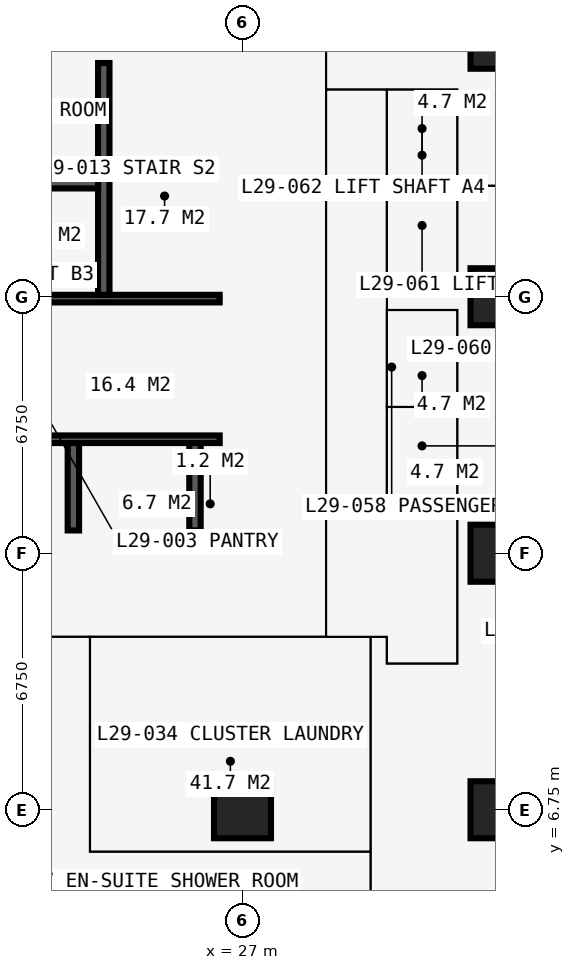
"""IFC4 building model, lengths in metres.
Left out: names, types, materials, properties, quantities, classifications, styles, units other than length and angle.
Written with IfcOpenShell. Run it as: python <this file> out.ifc"""

import sys

from ifc_helpers import new_model, si_unit, direction, frame, frame_2d, origin, origin_2d, place, context, subcontext, project, spatial, rectangle, extrude, element, fill, save


model = new_model("IFC4")
c1 = context("Model", 3, precision=1e-05, world=origin(), true_north=direction((0.0, 1.0)))
c2 = subcontext(c1, "Body", "Model", "MODEL_VIEW")
j1 = project(units=[si_unit("LENGTHUNIT", "METRE"), si_unit("PLANEANGLEUNIT", "RADIAN")], contexts=[c1])
p1 = place(None, origin())
s1 = spatial("IfcSite", under=j1, at=p1, CompositionType="ELEMENT")
p2 = place(p1, origin())
s2 = spatial("IfcBuilding", under=s1, at=p2, CompositionType="ELEMENT")
p3 = place(p2, frame((0.0, 0.0, 108.9)))
s3 = spatial("IfcBuildingStorey", under=s2, at=p3, CompositionType="ELEMENT", Elevation=108.9)
for number, where, z_axis, x_axis in (
    (1, (27.0, 6.75, 0.0), (0.0, 0.0, 1.0), (1.0, 0.0, 0.0)),
    (2, (33.75, 6.75, 0.0), (0.0, 0.0, 1.0), (1.0, 0.0, 0.0)),
    (3, (33.75, 13.5, 0.0), (0.0, 0.0, 1.0), (1.0, 0.0, 0.0)),
    (4, (33.75, 20.25, 0.0), (0.0, 0.0, 1.0), (1.0, 0.0, 0.0)),
    (5, (33.75, 27.0, 0.0), (0.0, 0.0, 1.0), (1.0, 0.0, 0.0)),
):
    element("IfcColumn", number, at=place(p3, frame(where, z_axis=z_axis, x_axis=x_axis)), inside=s3, PredefinedType="COLUMN", context=c2, shape_type="SweptSolid", body=[
        extrude(rectangle(XDim=1.5, YDim=1.5, at=origin_2d()), origin(), (0.0, 0.0, 1.0), 3.6),
    ])
p4 = place(p3, frame((12.9, 13.5, 0.0), z_axis=(0.0, 0.0, 1.0), x_axis=(1.0, 0.0, 0.0)))
e6 = element("IfcWall", 6, at=p4, inside=s3, PredefinedType="SHEAR", context=c2, shape_type="SweptSolid", body=[
    extrude(rectangle(XDim=14.7, YDim=1.2, at=frame_2d((7.35, 0.0))), origin(), (0.0, 0.0, 1.0), 3.6),
])
p5 = place(p3, frame((27.0, 14.1, 0.0), z_axis=(0.0, 0.0, 1.0), x_axis=(0.0, 1.0, 0.0)))
e7 = element("IfcWall", 7, at=p5, inside=s3, PredefinedType="SHEAR", context=c2, shape_type="SweptSolid", body=[
    extrude(rectangle(XDim=12.3, YDim=1.2, at=frame_2d((6.15, 0.0))), origin(), (0.0, 0.0, 1.0), 3.6),
])
p6 = place(p5, frame((3.65, 0.0, 0.0)))
e8 = element("IfcOpeningElement", 8, at=p6, cuts=e7, PredefinedType="OPENING", context=c2, shape_type="SweptSolid", body=[
    extrude(rectangle(XDim=1.2, YDim=2.2, at=frame_2d((0.6, 1.1))), frame((0.0, 0.61, 0.0), z_axis=(0.0, -1.0, 0.0), x_axis=(1.0, 0.0, 0.0)), (0.0, 0.0, 1.0), 1.22),
])
p7 = place(p3, frame((27.6, 27.0, 0.0), z_axis=(0.0, 0.0, 1.0), x_axis=(-1.0, 0.0, 0.0)))
e9 = element("IfcWall", 9, at=p7, inside=s3, PredefinedType="SHEAR", context=c2, shape_type="SweptSolid", body=[
    extrude(rectangle(XDim=14.7, YDim=1.2, at=frame_2d((7.35, 0.0))), origin(), (0.0, 0.0, 1.0), 3.6),
])
p8 = place(p7, frame((4.55, 0.0, 0.0)))
e10 = element("IfcOpeningElement", 10, at=p8, cuts=e9, PredefinedType="OPENING", context=c2, shape_type="SweptSolid", body=[
    extrude(rectangle(XDim=0.9, YDim=2.2, at=frame_2d((0.45, 1.1))), frame((0.0, 0.61, 0.0), z_axis=(0.0, -1.0, 0.0), x_axis=(1.0, 0.0, 0.0)), (0.0, 0.0, 1.0), 1.22),
])
p9 = place(p7, frame((7.525, 0.0, 0.0)))
e11 = element("IfcOpeningElement", 11, at=p9, cuts=e9, PredefinedType="OPENING", context=c2, shape_type="SweptSolid", body=[
    extrude(rectangle(XDim=1.0, YDim=2.2, at=frame_2d((0.5, 1.1))), frame((0.0, 0.61, 0.0), z_axis=(0.0, -1.0, 0.0), x_axis=(1.0, 0.0, 0.0)), (0.0, 0.0, 1.0), 1.22),
])
p10 = place(p3, frame((14.1, 16.5, 0.0), z_axis=(0.0, 0.0, 1.0), x_axis=(1.0, 0.0, 0.0)))
e12 = element("IfcWall", 12, at=p10, inside=s3, PredefinedType="SHEAR", context=c2, shape_type="SweptSolid", body=[
    extrude(rectangle(XDim=12.3, YDim=0.2, at=frame_2d((6.15, 0.0))), origin(), (0.0, 0.0, 1.0), 3.6),
])
p11 = place(p10, frame((0.9, 0.0, 0.0)))
e13 = element("IfcOpeningElement", 13, at=p11, cuts=e12, PredefinedType="OPENING", context=c2, shape_type="SweptSolid", body=[
    extrude(rectangle(XDim=1.1, YDim=2.2, at=frame_2d((0.55, 1.1))), frame((0.0, 0.11, 0.0), z_axis=(0.0, -1.0, 0.0), x_axis=(1.0, 0.0, 0.0)), (0.0, 0.0, 1.0), 0.22),
])
p12 = place(p10, frame((9.5, 0.0, 0.0)))
e14 = element("IfcOpeningElement", 14, at=p12, cuts=e12, PredefinedType="OPENING", context=c2, shape_type="SweptSolid", body=[
    extrude(rectangle(XDim=1.1, YDim=2.2, at=frame_2d((0.55, 1.1))), frame((0.0, 0.11, 0.0), z_axis=(0.0, -1.0, 0.0), x_axis=(1.0, 0.0, 0.0)), (0.0, 0.0, 1.0), 0.22),
])
p13 = place(p3, frame((14.1, 20.2, 0.0), z_axis=(0.0, 0.0, 1.0), x_axis=(1.0, 0.0, 0.0)))
e15 = element("IfcWall", 15, at=p13, inside=s3, PredefinedType="SHEAR", context=c2, shape_type="SweptSolid", body=[
    extrude(rectangle(XDim=12.3, YDim=0.2, at=frame_2d((6.15, 0.0))), origin(), (0.0, 0.0, 1.0), 3.6),
])
p14 = place(p13, frame((0.35, 0.0, 0.0)))
e16 = element("IfcOpeningElement", 16, at=p14, cuts=e15, PredefinedType="OPENING", context=c2, shape_type="SweptSolid", body=[
    extrude(rectangle(XDim=1.1, YDim=2.2, at=frame_2d((0.55, 1.1))), frame((0.0, 0.11, 0.0), z_axis=(0.0, -1.0, 0.0), x_axis=(1.0, 0.0, 0.0)), (0.0, 0.0, 1.0), 0.22),
])
p15 = place(p13, frame((9.75, 0.0, 0.0)))
e17 = element("IfcOpeningElement", 17, at=p15, cuts=e15, PredefinedType="OPENING", context=c2, shape_type="SweptSolid", body=[
    extrude(rectangle(XDim=1.1, YDim=2.2, at=frame_2d((0.55, 1.1))), frame((0.0, 0.11, 0.0), z_axis=(0.0, -1.0, 0.0), x_axis=(1.0, 0.0, 0.0)), (0.0, 0.0, 1.0), 0.22),
])
p16 = place(p3, frame((23.35, 20.3, 0.0), z_axis=(0.0, 0.0, 1.0), x_axis=(0.0, 1.0, 0.0)))
e18 = element("IfcWall", 18, at=p16, inside=s3, PredefinedType="SHEAR", context=c2, shape_type="SweptSolid", body=[
    extrude(rectangle(XDim=6.1, YDim=0.3, at=frame_2d((3.05, 0.0))), origin(), (0.0, 0.0, 1.0), 3.6),
])
p17 = place(p3, frame((17.3, 23.25, 0.0), z_axis=(0.0, 0.0, 1.0), x_axis=(1.0, 0.0, 0.0)))
e19 = element("IfcWall", 19, at=p17, inside=s3, PredefinedType="SHEAR", context=c2, shape_type="SweptSolid", body=[
    extrude(rectangle(XDim=5.9, YDim=0.3, at=frame_2d((2.95, 0.0))), origin(), (0.0, 0.0, 1.0), 3.6),
])
for number, where, z_axis, x_axis in (
    (20, (22.55, 14.1, 0.0), (0.0, 0.0, 1.0), (0.0, 1.0, 0.0)),
    (21, (25.75, 14.1, 0.0), (0.0, 0.0, 1.0), (0.0, 1.0, 0.0)),
):
    element("IfcWall", number, at=place(p3, frame(where, z_axis=z_axis, x_axis=x_axis)), inside=s3, PredefinedType="SHEAR", context=c2, shape_type="SweptSolid", body=[
        extrude(rectangle(XDim=2.3, YDim=0.3, at=frame_2d((1.15, 0.0))), origin(), (0.0, 0.0, 1.0), 3.6),
    ])
p18 = place(p3, frame((10.125, 11.3, 0.0), z_axis=(0.0, 0.0, 1.0), x_axis=(1.0, 0.0, 0.0)))
e22 = element("IfcWall", 22, at=p18, inside=s3, PredefinedType="PARTITIONING", context=c2, shape_type="SweptSolid", body=[
    extrude(rectangle(XDim=20.675, YDim=0.15, at=frame_2d((10.337, 0.0))), origin(), (0.0, 0.0, 1.0), 3.375),
])
p19 = place(p18, frame((11.312, 0.0, 0.0)))
e23 = element("IfcOpeningElement", 23, at=p19, cuts=e22, PredefinedType="OPENING", context=c2, shape_type="SweptSolid", body=[
    extrude(rectangle(XDim=1.0, YDim=2.2, at=frame_2d((0.5, 1.1))), frame((0.0, 0.085, 0.0), z_axis=(0.0, -1.0, 0.0), x_axis=(1.0, 0.0, 0.0)), (0.0, 0.0, 1.0), 0.17),
])
p20 = place(p3, frame((22.988, 5.65, 0.0), z_axis=(0.0, 0.0, 1.0), x_axis=(1.0, 0.0, 0.0)))
e24 = element("IfcWall", 24, at=p20, inside=s3, PredefinedType="PARTITIONING", context=c2, shape_type="SweptSolid", body=[
    extrude(rectangle(XDim=7.387, YDim=0.15, at=frame_2d((3.694, 0.0))), origin(), (0.0, 0.0, 1.0), 3.375),
])
p21 = place(p20, frame((2.3, 0.0, 0.0)))
e25 = element("IfcOpeningElement", 25, at=p21, cuts=e24, PredefinedType="OPENING", context=c2, shape_type="SweptSolid", body=[
    extrude(rectangle(XDim=0.95, YDim=2.2, at=frame_2d((0.475, 1.1))), frame((0.0, 0.085, 0.0), z_axis=(0.0, -1.0, 0.0), x_axis=(1.0, 0.0, 0.0)), (0.0, 0.0, 1.0), 0.17),
])
p22 = place(p3, frame((22.988, 5.65, 0.0), z_axis=(0.0, 0.0, 1.0), x_axis=(0.0, 1.0, 0.0)))
e26 = element("IfcWall", 26, at=p22, inside=s3, PredefinedType="PARTITIONING", context=c2, shape_type="SweptSolid", body=[
    extrude(rectangle(XDim=5.65, YDim=0.15, at=frame_2d((2.825, 0.0))), origin(), (0.0, 0.0, 1.0), 3.375),
])
p23 = place(p3, frame((29.2, 11.3, 0.0), z_axis=(0.0, 0.0, 1.0), x_axis=(0.0, 1.0, 0.0)))
e27 = element("IfcWall", 27, at=p23, inside=s3, PredefinedType="PARTITIONING", context=c2, shape_type="SweptSolid", body=[
    extrude(rectangle(XDim=20.3, YDim=0.15, at=frame_2d((10.15, 0.0))), origin(), (0.0, 0.0, 1.0), 3.375),
])
p24 = place(p23, frame((8.35, 0.0, 0.0)))
e28 = element("IfcOpeningElement", 28, at=p24, cuts=e27, PredefinedType="OPENING", context=c2, shape_type="SweptSolid", body=[
    extrude(rectangle(XDim=1.2, YDim=2.2, at=frame_2d((0.6, 1.1))), frame((0.0, 0.085, 0.0), z_axis=(0.0, -1.0, 0.0), x_axis=(1.0, 0.0, 0.0)), (0.0, 0.0, 1.0), 0.17),
])
p25 = place(p3, frame((29.2, 25.7, 0.0), z_axis=(0.0, 0.0, 1.0), x_axis=(1.0, 0.0, 0.0)))
e29 = element("IfcWall", 29, at=p25, inside=s3, PredefinedType="SHEAR", context=c2, shape_type="SweptSolid", body=[
    extrude(rectangle(XDim=3.45, YDim=0.1, at=frame_2d((1.725, 0.0))), origin(), (0.0, 0.0, 1.0), 3.375),
])
p26 = place(p3, frame((30.375, -0.734, 0.0), z_axis=(0.0, 0.0, 1.0), x_axis=(0.0, 1.0, 0.0)))
e30 = element("IfcWall", 30, at=p26, inside=s3, PredefinedType="PARTITIONING", context=c2, shape_type="SweptSolid", body=[
    extrude(rectangle(XDim=12.034, YDim=0.15, at=frame_2d((6.017, 0.0))), origin(), (0.0, 0.0, 1.0), 3.375),
])
p27 = place(p3, frame((30.8, 10.6, 0.0), z_axis=(0.0, 0.0, 1.0), x_axis=(0.0, 1.0, 0.0)))
e31 = element("IfcWall", 31, at=p27, inside=s3, PredefinedType="PARTITIONING", context=c2, shape_type="SweptSolid", body=[
    extrude(rectangle(XDim=0.7, YDim=0.15, at=frame_2d((0.35, 0.0))), origin(), (0.0, 0.0, 1.0), 3.375),
])
p28 = place(p3, frame((30.8, 10.6, 0.0), z_axis=(0.0, 0.0, 1.0), x_axis=(1.0, 0.0, 0.0)))
e32 = element("IfcWall", 32, at=p28, inside=s3, PredefinedType="PARTITIONING", context=c2, shape_type="SweptSolid", body=[
    extrude(rectangle(XDim=1.85, YDim=0.15, at=frame_2d((0.925, 0.0))), origin(), (0.0, 0.0, 1.0), 3.375),
])
p29 = place(p3, frame((30.8, 14.8, 0.0), z_axis=(0.0, 0.0, 1.0), x_axis=(0.0, 1.0, 0.0)))
e33 = element("IfcWall", 33, at=p29, inside=s3, PredefinedType="PARTITIONING", context=c2, shape_type="SweptSolid", body=[
    extrude(rectangle(XDim=10.9, YDim=0.15, at=frame_2d((5.45, 0.0))), origin(), (0.0, 0.0, 1.0), 3.375),
])
p30 = place(p29, frame((0.75, 0.0, 0.0)))
e34 = element("IfcOpeningElement", 34, at=p30, cuts=e33, PredefinedType="OPENING", context=c2, shape_type="SweptSolid", body=[
    extrude(rectangle(XDim=1.1, YDim=2.2, at=frame_2d((0.55, 1.1))), frame((0.0, 0.085, 0.0), z_axis=(0.0, -1.0, 0.0), x_axis=(1.0, 0.0, 0.0)), (0.0, 0.0, 1.0), 0.17),
])
p31 = place(p29, frame((3.25, 0.0, 0.0)))
e35 = element("IfcOpeningElement", 35, at=p31, cuts=e33, PredefinedType="OPENING", context=c2, shape_type="SweptSolid", body=[
    extrude(rectangle(XDim=1.1, YDim=2.2, at=frame_2d((0.55, 1.1))), frame((0.0, 0.085, 0.0), z_axis=(0.0, -1.0, 0.0), x_axis=(1.0, 0.0, 0.0)), (0.0, 0.0, 1.0), 0.17),
])
p32 = place(p29, frame((6.5, 0.0, 0.0)))
e36 = element("IfcOpeningElement", 36, at=p32, cuts=e33, PredefinedType="OPENING", context=c2, shape_type="SweptSolid", body=[
    extrude(rectangle(XDim=1.1, YDim=2.2, at=frame_2d((0.55, 1.1))), frame((0.0, 0.085, 0.0), z_axis=(0.0, -1.0, 0.0), x_axis=(1.0, 0.0, 0.0)), (0.0, 0.0, 1.0), 0.17),
])
p33 = place(p29, frame((9.05, 0.0, 0.0)))
e37 = element("IfcOpeningElement", 37, at=p33, cuts=e33, PredefinedType="OPENING", context=c2, shape_type="SweptSolid", body=[
    extrude(rectangle(XDim=1.1, YDim=2.2, at=frame_2d((0.55, 1.1))), frame((0.0, 0.085, 0.0), z_axis=(0.0, -1.0, 0.0), x_axis=(1.0, 0.0, 0.0)), (0.0, 0.0, 1.0), 0.17),
])
for number, where, z_axis, x_axis in (
    (38, (30.8, 14.8, 0.0), (0.0, 0.0, 1.0), (1.0, 0.0, 0.0)),
    (39, (30.8, 17.35, 0.0), (0.0, 0.0, 1.0), (1.0, 0.0, 0.0)),
    (40, (30.8, 19.9, 0.0), (0.0, 0.0, 1.0), (1.0, 0.0, 0.0)),
    (41, (30.8, 20.6, 0.0), (0.0, 0.0, 1.0), (1.0, 0.0, 0.0)),
    (42, (30.8, 23.15, 0.0), (0.0, 0.0, 1.0), (1.0, 0.0, 0.0)),
):
    element("IfcWall", number, at=place(p3, frame(where, z_axis=z_axis, x_axis=x_axis)), inside=s3, PredefinedType="SHEAR", context=c2, shape_type="SweptSolid", body=[
        extrude(rectangle(XDim=1.85, YDim=0.1, at=frame_2d((0.925, 0.0))), origin(), (0.0, 0.0, 1.0), 3.375),
    ])
p34 = place(p3, frame((32.65, 10.6, 0.0), z_axis=(0.0, 0.0, 1.0), x_axis=(0.0, 1.0, 0.0)))
e43 = element("IfcWall", 43, at=p34, inside=s3, PredefinedType="SHEAR", context=c2, shape_type="SweptSolid", body=[
    extrude(rectangle(XDim=9.3, YDim=0.1, at=frame_2d((4.65, 0.0))), origin(), (0.0, 0.0, 1.0), 3.375),
])
p35 = place(p34, frame((0.6, 0.0, 0.0)))
e44 = element("IfcOpeningElement", 44, at=p35, cuts=e43, PredefinedType="OPENING", context=c2, shape_type="SweptSolid", body=[
    extrude(rectangle(XDim=1.5, YDim=2.2, at=frame_2d((0.75, 1.1))), frame((0.0, 0.06, 0.0), z_axis=(0.0, -1.0, 0.0), x_axis=(1.0, 0.0, 0.0)), (0.0, 0.0, 1.0), 0.12),
])
p36 = place(p3, frame((32.65, 20.6, 0.0), z_axis=(0.0, 0.0, 1.0), x_axis=(0.0, 1.0, 0.0)))
e45 = element("IfcWall", 45, at=p36, inside=s3, PredefinedType="PARTITIONING", context=c2, shape_type="SweptSolid", body=[
    extrude(rectangle(XDim=5.1, YDim=0.15, at=frame_2d((2.55, 0.0))), origin(), (0.0, 0.0, 1.0), 3.375),
])
p37 = place(p3, frame((32.65, 23.168, 0.0), z_axis=(0.0, 0.0, 1.0), x_axis=(1.0, 0.0, 0.0)))
e46 = element("IfcWall", 46, at=p37, inside=s3, PredefinedType="PARTITIONING", context=c2, shape_type="SweptSolid", body=[
    extrude(rectangle(XDim=8.584, YDim=0.15, at=frame_2d((4.292, 0.0))), origin(), (0.0, 0.0, 1.0), 3.375),
])
p38 = place(p37, frame((3.5, 0.0, 0.0)))
e47 = element("IfcOpeningElement", 47, at=p38, cuts=e46, PredefinedType="OPENING", context=c2, shape_type="SweptSolid", body=[
    extrude(rectangle(XDim=1.6, YDim=2.4, at=frame_2d((0.8, 1.2))), frame((0.0, 0.085, 0.0), z_axis=(0.0, -1.0, 0.0), x_axis=(1.0, 0.0, 0.0)), (0.0, 0.0, 1.0), 0.17),
])
p39 = place(p12, origin())
e48 = element("IfcDoor", 48, at=p39, inside=s3, OperationType="DOUBLE_DOOR_SLIDING", PredefinedType="DOOR", context=c2, shape_type="SweptSolid", body=[
    extrude(rectangle(XDim=1.1, YDim=2.2, at=frame_2d((0.55, 1.1))), frame((0.0, 0.025, 0.0), z_axis=(0.0, -1.0, 0.0), x_axis=(1.0, 0.0, 0.0)), (0.0, 0.0, 1.0), 0.05),
])
fill(e14, e48)
p40 = place(p6, origin())
e49 = element("IfcDoor", 49, at=p40, inside=s3, OperationType="DOUBLE_DOOR_SINGLE_SWING", PredefinedType="DOOR", context=c2, shape_type="SweptSolid", body=[
    extrude(rectangle(XDim=1.2, YDim=2.2, at=frame_2d((0.6, 1.1))), frame((0.0, 0.025, 0.0), z_axis=(0.0, -1.0, 0.0), x_axis=(1.0, 0.0, 0.0)), (0.0, 0.0, 1.0), 0.05),
])
fill(e8, e49)
p41 = place(p8, origin())
e50 = element("IfcDoor", 50, at=p41, inside=s3, OperationType="SINGLE_SWING_LEFT", PredefinedType="DOOR", context=c2, shape_type="SweptSolid", body=[
    extrude(rectangle(XDim=0.9, YDim=2.2, at=frame_2d((0.45, 1.1))), frame((0.0, 0.4, 0.0), z_axis=(0.0, -1.0, 0.0), x_axis=(1.0, 0.0, 0.0)), (0.0, 0.0, 1.0), 0.8),
])
fill(e10, e50)
p42 = place(p15, origin())
e51 = element("IfcDoor", 51, at=p42, inside=s3, OperationType="SINGLE_SWING_LEFT", PredefinedType="DOOR", context=c2, shape_type="SweptSolid", body=[
    extrude(rectangle(XDim=1.1, YDim=2.2, at=frame_2d((0.55, 1.1))), frame((0.0, 0.025, 0.0), z_axis=(0.0, -1.0, 0.0), x_axis=(1.0, 0.0, 0.0)), (0.0, 0.0, 1.0), 0.05),
])
fill(e17, e51)
p43 = place(p19, origin())
e52 = element("IfcDoor", 52, at=p43, inside=s3, OperationType="SINGLE_SWING_LEFT", PredefinedType="DOOR", context=c2, shape_type="SweptSolid", body=[
    extrude(rectangle(XDim=1.0, YDim=2.2, at=frame_2d((0.5, 1.1))), frame((0.0, 0.025, 0.0), z_axis=(0.0, -1.0, 0.0), x_axis=(1.0, 0.0, 0.0)), (0.0, 0.0, 1.0), 0.05),
])
fill(e23, e52)
p44 = place(p21, origin())
e53 = element("IfcDoor", 53, at=p44, inside=s3, OperationType="SINGLE_SWING_LEFT", PredefinedType="DOOR", context=c2, shape_type="SweptSolid", body=[
    extrude(rectangle(XDim=0.95, YDim=2.2, at=frame_2d((0.475, 1.1))), frame((0.0, 0.025, 0.0), z_axis=(0.0, -1.0, 0.0), x_axis=(1.0, 0.0, 0.0)), (0.0, 0.0, 1.0), 0.05),
])
fill(e25, e53)
p45 = place(p35, origin())
e54 = element("IfcDoor", 54, at=p45, inside=s3, OperationType="DOUBLE_DOOR_SINGLE_SWING", PredefinedType="DOOR", context=c2, shape_type="SweptSolid", body=[
    extrude(rectangle(XDim=1.5, YDim=2.2, at=frame_2d((0.75, 1.1))), frame((0.0, 0.025, 0.0), z_axis=(0.0, -1.0, 0.0), x_axis=(1.0, 0.0, 0.0)), (0.0, 0.0, 1.0), 0.05),
])
fill(e44, e54)
p46 = place(p30, origin())
e55 = element("IfcDoor", 55, at=p46, inside=s3, OperationType="DOUBLE_DOOR_SLIDING", PredefinedType="DOOR", context=c2, shape_type="SweptSolid", body=[
    extrude(rectangle(XDim=1.1, YDim=2.2, at=frame_2d((0.55, 1.1))), frame((0.0, 0.025, 0.0), z_axis=(0.0, -1.0, 0.0), x_axis=(1.0, 0.0, 0.0)), (0.0, 0.0, 1.0), 0.05),
])
fill(e34, e55)
p47 = place(p31, origin())
e56 = element("IfcDoor", 56, at=p47, inside=s3, OperationType="DOUBLE_DOOR_SLIDING", PredefinedType="DOOR", context=c2, shape_type="SweptSolid", body=[
    extrude(rectangle(XDim=1.1, YDim=2.2, at=frame_2d((0.55, 1.1))), frame((0.0, 0.025, 0.0), z_axis=(0.0, -1.0, 0.0), x_axis=(1.0, 0.0, 0.0)), (0.0, 0.0, 1.0), 0.05),
])
fill(e35, e56)
p48 = place(p32, origin())
e57 = element("IfcDoor", 57, at=p48, inside=s3, OperationType="DOUBLE_DOOR_SLIDING", PredefinedType="DOOR", context=c2, shape_type="SweptSolid", body=[
    extrude(rectangle(XDim=1.1, YDim=2.2, at=frame_2d((0.55, 1.1))), frame((0.0, 0.025, 0.0), z_axis=(0.0, -1.0, 0.0), x_axis=(1.0, 0.0, 0.0)), (0.0, 0.0, 1.0), 0.05),
])
fill(e36, e57)
p49 = place(p33, origin())
e58 = element("IfcDoor", 58, at=p49, inside=s3, OperationType="DOUBLE_DOOR_SLIDING", PredefinedType="DOOR", context=c2, shape_type="SweptSolid", body=[
    extrude(rectangle(XDim=1.1, YDim=2.2, at=frame_2d((0.55, 1.1))), frame((0.0, 0.025, 0.0), z_axis=(0.0, -1.0, 0.0), x_axis=(1.0, 0.0, 0.0)), (0.0, 0.0, 1.0), 0.05),
])
fill(e37, e58)
p50 = place(p24, origin())
e59 = element("IfcDoor", 59, at=p50, inside=s3, OperationType="DOUBLE_DOOR_SINGLE_SWING", PredefinedType="DOOR", context=c2, shape_type="SweptSolid", body=[
    extrude(rectangle(XDim=1.2, YDim=2.2, at=frame_2d((0.6, 1.1))), frame((0.0, 0.025, 0.0), z_axis=(0.0, -1.0, 0.0), x_axis=(1.0, 0.0, 0.0)), (0.0, 0.0, 1.0), 0.05),
])
fill(e28, e59)
save(model, sys.argv[1])
